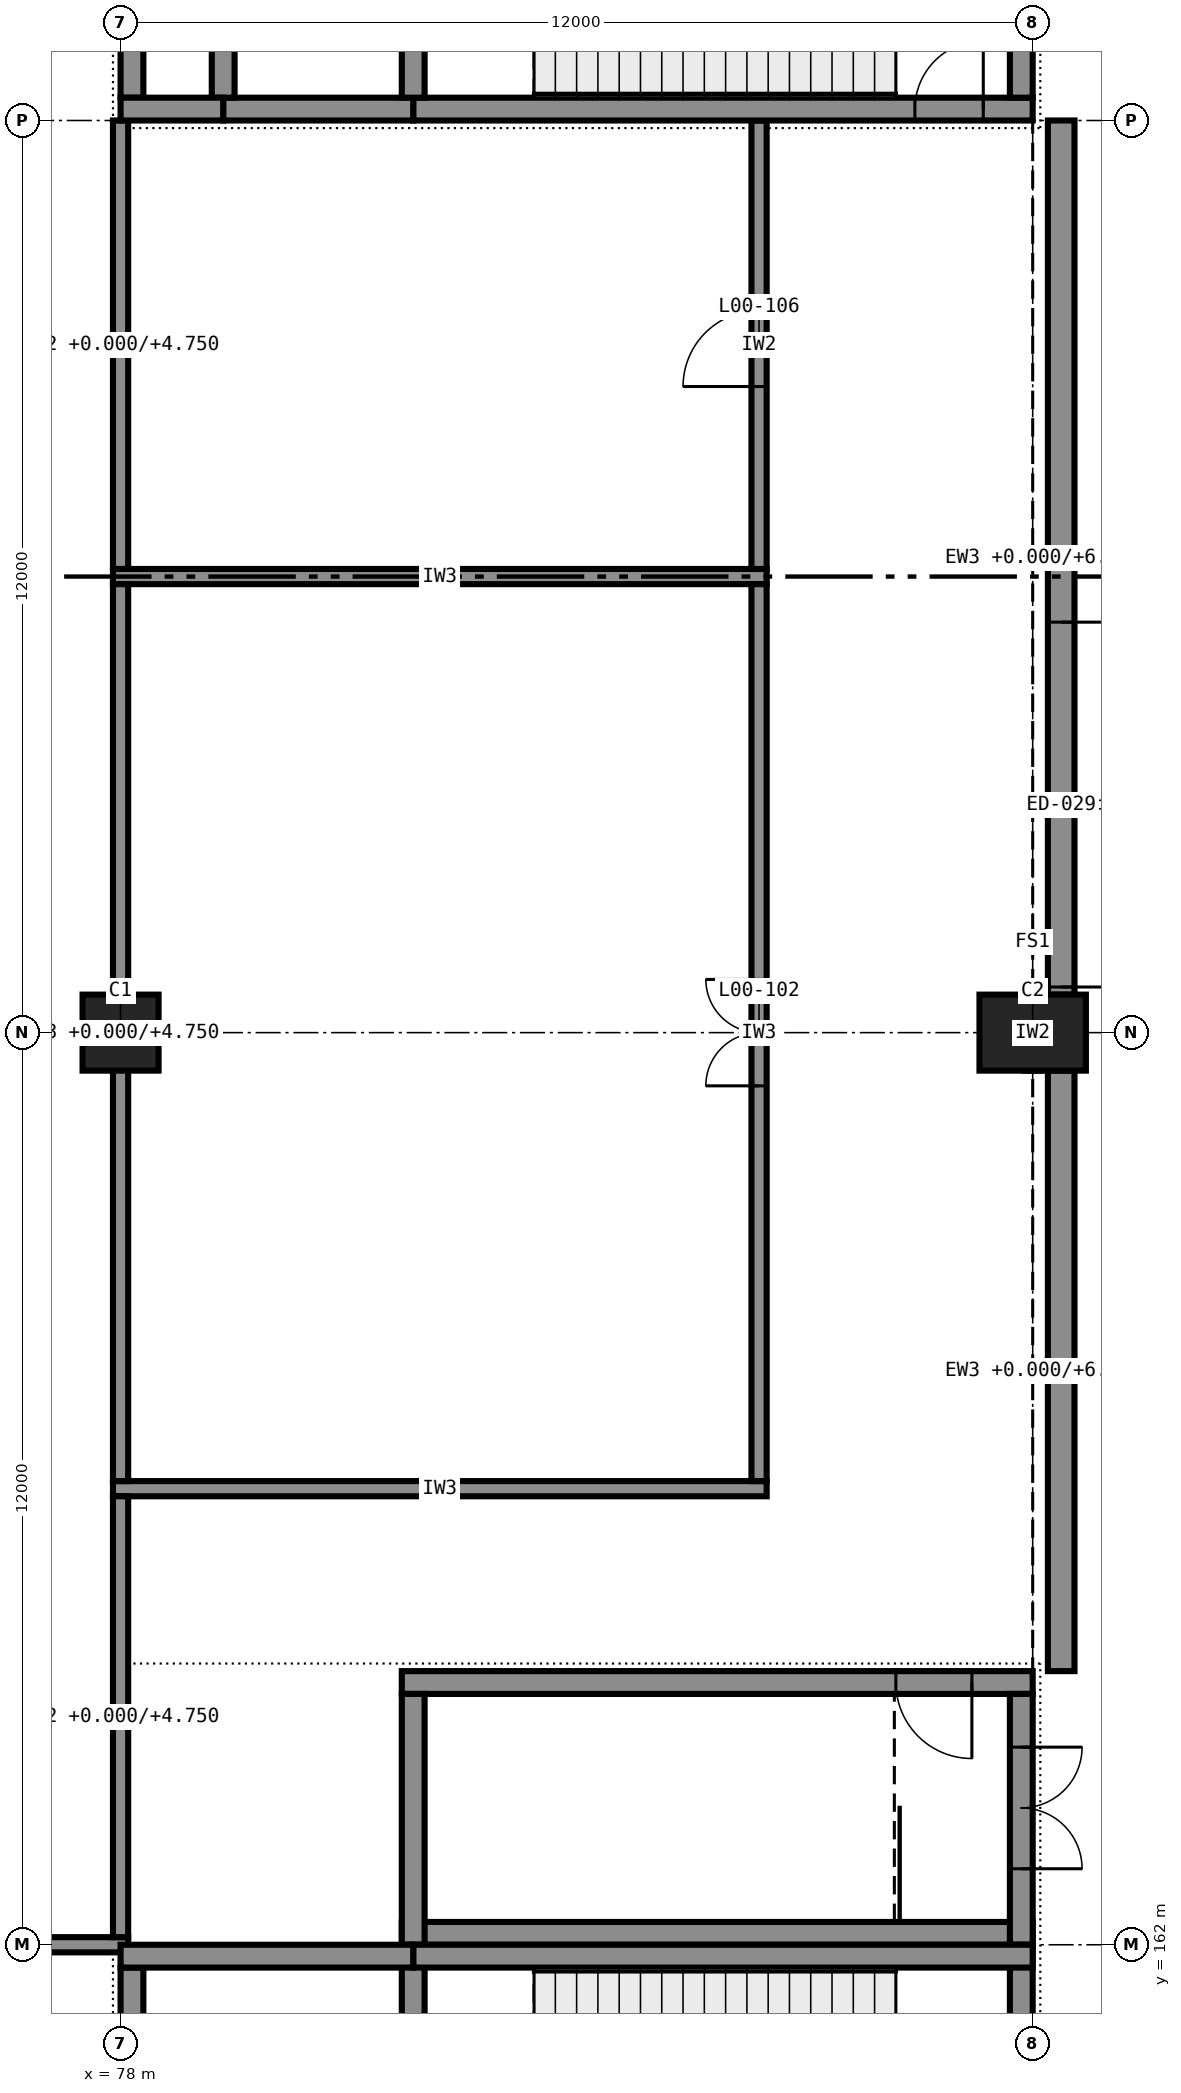
"""IFC4 building model, lengths in metres.
Left out: names, types, materials, properties, quantities, classifications, styles, units other than length and angle.
Written with IfcOpenShell. Run it as: python <this file> out.ifc"""

import sys

from ifc_helpers import new_model, si_unit, direction, frame, frame_2d, origin, origin_2d, place, context, subcontext, project, spatial, rectangle, extrude, element, fill, save


model = new_model("IFC4")
c1 = context("Model", 3, precision=1e-05, world=origin(), true_north=direction((0.0, 1.0)))
c2 = subcontext(c1, "Body", "Model", "MODEL_VIEW")
j1 = project(units=[si_unit("LENGTHUNIT", "METRE"), si_unit("PLANEANGLEUNIT", "RADIAN")], contexts=[c1])
p1 = place(None, origin())
s1 = spatial("IfcSite", under=j1, at=p1, CompositionType="ELEMENT")
p2 = place(p1, origin())
s2 = spatial("IfcBuilding", under=s1, at=p2, CompositionType="ELEMENT")
p3 = place(p2, origin())
s3 = spatial("IfcBuildingStorey", under=s2, at=p3, CompositionType="ELEMENT", Elevation=0.0)
p4 = place(p3, frame((78.0, 174.0, 0.0), z_axis=(0.0, 0.0, 1.0), x_axis=(1.0, 0.0, 0.0)))
e1 = element("IfcColumn", 1, at=p4, inside=s3, PredefinedType="COLUMN", context=c2, shape_type="SweptSolid", body=[
    extrude(rectangle(XDim=1.0, YDim=1.0, at=origin_2d()), origin(), (0.0, 0.0, 1.0), 6.0),
])
p5 = place(p3, frame((90.0, 174.0, 0.0), z_axis=(0.0, 0.0, 1.0), x_axis=(1.0, 0.0, 0.0)))
e2 = element("IfcColumn", 2, at=p5, inside=s3, PredefinedType="COLUMN", context=c2, shape_type="SweptSolid", body=[
    extrude(rectangle(XDim=1.4, YDim=1.0, at=origin_2d()), origin(), (0.0, 0.0, 1.0), 6.0),
])
p6 = place(p3, frame((90.0, 162.15, 0.0), z_axis=(0.0, 0.0, 1.0), x_axis=(-1.0, 0.0, 0.0)))
e3 = element("IfcWall", 3, at=p6, inside=s3, PredefinedType="SHEAR", context=c2, shape_type="SweptSolid", body=[
    extrude(rectangle(XDim=8.3, YDim=0.3, at=frame_2d((4.15, 0.0))), origin(), (0.0, 0.0, 1.0), 5.75),
])
p7 = place(p3, frame((90.0, 165.45, 0.0), z_axis=(0.0, 0.0, 1.0), x_axis=(-1.0, 0.0, 0.0)))
e4 = element("IfcWall", 4, at=p7, inside=s3, PredefinedType="SHEAR", context=c2, shape_type="SweptSolid", body=[
    extrude(rectangle(XDim=8.3, YDim=0.3, at=frame_2d((4.15, 0.0))), origin(), (0.0, 0.0, 1.0), 5.75),
])
p8 = place(p7, frame((0.8, 0.0, 0.0)))
e5 = element("IfcOpeningElement", 5, at=p8, cuts=e4, PredefinedType="OPENING", context=c2, shape_type="SweptSolid", body=[
    extrude(rectangle(XDim=1.0, YDim=2.1, at=frame_2d((0.5, 1.05))), frame((0.0, 0.16, 0.0), z_axis=(0.0, -1.0, 0.0), x_axis=(1.0, 0.0, 0.0)), (0.0, 0.0, 1.0), 0.32),
])
p9 = place(p3, frame((89.85, 162.0, 0.0), z_axis=(0.0, 0.0, 1.0), x_axis=(0.0, 1.0, 0.0)))
e6 = element("IfcWall", 6, at=p9, inside=s3, PredefinedType="SHEAR", context=c2, shape_type="SweptSolid", body=[
    extrude(rectangle(XDim=3.3, YDim=0.3, at=frame_2d((1.65, 0.0))), origin(), (0.0, 0.0, 1.0), 5.75),
])
p10 = place(p9, frame((1.0, 0.0, 0.0)))
e7 = element("IfcOpeningElement", 7, at=p10, cuts=e6, PredefinedType="OPENING", context=c2, shape_type="SweptSolid", body=[
    extrude(rectangle(XDim=1.6, YDim=2.1, at=frame_2d((0.8, 1.05))), frame((0.0, 0.16, 0.0), z_axis=(0.0, -1.0, 0.0), x_axis=(1.0, 0.0, 0.0)), (0.0, 0.0, 1.0), 0.32),
])
p11 = place(p3, frame((81.85, 162.0, 0.0), z_axis=(0.0, 0.0, 1.0), x_axis=(0.0, 1.0, 0.0)))
e8 = element("IfcWall", 8, at=p11, inside=s3, PredefinedType="SHEAR", context=c2, shape_type="SweptSolid", body=[
    extrude(rectangle(XDim=3.3, YDim=0.3, at=frame_2d((1.65, 0.0))), origin(), (0.0, 0.0, 1.0), 5.75),
])
p12 = place(p3, frame((90.0, 161.85, 0.0), z_axis=(0.0, 0.0, 1.0), x_axis=(-1.0, 0.0, 0.0)))
e9 = element("IfcWall", 9, at=p12, inside=s3, PredefinedType="SHEAR", context=c2, shape_type="SweptSolid", body=[
    extrude(rectangle(XDim=8.15, YDim=0.3, at=frame_2d((4.075, 0.0))), origin(), (0.0, 0.0, 1.0), 5.75),
])
p13 = place(p3, frame((81.85, 161.85, 0.0), z_axis=(0.0, 0.0, 1.0), x_axis=(-1.0, 0.0, 0.0)))
e10 = element("IfcWall", 10, at=p13, inside=s3, PredefinedType="SHEAR", context=c2, shape_type="SweptSolid", body=[
    extrude(rectangle(XDim=3.85, YDim=0.3, at=frame_2d((1.925, 0.0))), origin(), (0.0, 0.0, 1.0), 5.75),
])
p14 = place(p3, frame((89.85, 158.55, 0.0), z_axis=(0.0, 0.0, 1.0), x_axis=(0.0, 1.0, 0.0)))
e11 = element("IfcWall", 11, at=p14, inside=s3, PredefinedType="SHEAR", context=c2, shape_type="SweptSolid", body=[
    extrude(rectangle(XDim=3.45, YDim=0.3, at=frame_2d((1.725, 0.0))), origin(), (0.0, 0.0, 1.0), 5.75),
])
p15 = place(p14, frame((0.85, 0.0, 0.0)))
e12 = element("IfcOpeningElement", 12, at=p15, cuts=e11, PredefinedType="OPENING", context=c2, shape_type="SweptSolid", body=[
    extrude(rectangle(XDim=1.6, YDim=2.1, at=frame_2d((0.8, 1.05))), frame((0.0, 0.16, 0.0), z_axis=(0.0, -1.0, 0.0), x_axis=(1.0, 0.0, 0.0)), (0.0, 0.0, 1.0), 0.32),
])
p16 = place(p3, frame((78.15, 158.55, 0.0), z_axis=(0.0, 0.0, 1.0), x_axis=(0.0, 1.0, 0.0)))
e13 = element("IfcWall", 13, at=p16, inside=s3, PredefinedType="SHEAR", context=c2, shape_type="SweptSolid", body=[
    extrude(rectangle(XDim=3.15, YDim=0.3, at=frame_2d((1.575, 0.0))), origin(), (0.0, 0.0, 1.0), 5.75),
])
p17 = place(p16, frame((1.15, 0.0, 0.0)))
e14 = element("IfcOpeningElement", 14, at=p17, cuts=e13, PredefinedType="OPENING", context=c2, shape_type="SweptSolid", body=[
    extrude(rectangle(XDim=1.0, YDim=2.1, at=frame_2d((0.5, 1.05))), frame((0.0, 0.16, 0.0), z_axis=(0.0, -1.0, 0.0), x_axis=(1.0, 0.0, 0.0)), (0.0, 0.0, 1.0), 0.32),
])
p18 = place(p3, frame((81.85, 158.7, 0.0), z_axis=(0.0, 0.0, 1.0), x_axis=(0.0, 1.0, 0.0)))
e15 = element("IfcWall", 15, at=p18, inside=s3, PredefinedType="SHEAR", context=c2, shape_type="SweptSolid", body=[
    extrude(rectangle(XDim=3.3, YDim=0.3, at=frame_2d((1.65, 0.0))), origin(), (0.0, 0.0, 1.0), 5.75),
])
p19 = place(p3, frame((90.0, 186.15, 0.0), z_axis=(0.0, 0.0, 1.0), x_axis=(-1.0, 0.0, 0.0)))
e16 = element("IfcWall", 16, at=p19, inside=s3, PredefinedType="SHEAR", context=c2, shape_type="SweptSolid", body=[
    extrude(rectangle(XDim=8.15, YDim=0.3, at=frame_2d((4.075, 0.0))), origin(), (0.0, 0.0, 1.0), 5.75),
])
p20 = place(p19, frame((0.65, 0.0, 0.0)))
e17 = element("IfcOpeningElement", 17, at=p20, cuts=e16, PredefinedType="OPENING", context=c2, shape_type="SweptSolid", body=[
    extrude(rectangle(XDim=0.9, YDim=2.1, at=frame_2d((0.45, 1.05))), frame((0.0, 0.16, 0.0), z_axis=(0.0, -1.0, 0.0), x_axis=(1.0, 0.0, 0.0)), (0.0, 0.0, 1.0), 0.32),
])
p21 = place(p3, frame((81.85, 186.15, 0.0), z_axis=(0.0, 0.0, 1.0), x_axis=(-1.0, 0.0, 0.0)))
e18 = element("IfcWall", 18, at=p21, inside=s3, PredefinedType="SHEAR", context=c2, shape_type="SweptSolid", body=[
    extrude(rectangle(XDim=2.5, YDim=0.3, at=frame_2d((1.25, 0.0))), origin(), (0.0, 0.0, 1.0), 5.75),
])
p22 = place(p3, frame((79.35, 186.15, 0.0), z_axis=(0.0, 0.0, 1.0), x_axis=(-1.0, 0.0, 0.0)))
e19 = element("IfcWall", 19, at=p22, inside=s3, PredefinedType="SHEAR", context=c2, shape_type="SweptSolid", body=[
    extrude(rectangle(XDim=1.35, YDim=0.3, at=frame_2d((0.675, 0.0))), origin(), (0.0, 0.0, 1.0), 5.75),
])
p23 = place(p3, frame((89.85, 186.3, 0.0), z_axis=(0.0, 0.0, 1.0), x_axis=(0.0, 1.0, 0.0)))
e20 = element("IfcWall", 20, at=p23, inside=s3, PredefinedType="SHEAR", context=c2, shape_type="SweptSolid", body=[
    extrude(rectangle(XDim=3.15, YDim=0.3, at=frame_2d((1.575, 0.0))), origin(), (0.0, 0.0, 1.0), 5.75),
])
p24 = place(p23, frame((0.65, 0.0, 0.0)))
e21 = element("IfcOpeningElement", 21, at=p24, cuts=e20, PredefinedType="OPENING", context=c2, shape_type="SweptSolid", body=[
    extrude(rectangle(XDim=1.6, YDim=2.1, at=frame_2d((0.8, 1.05))), frame((0.0, 0.16, 0.0), z_axis=(0.0, -1.0, 0.0), x_axis=(1.0, 0.0, 0.0)), (0.0, 0.0, 1.0), 0.32),
])
p25 = place(p3, frame((78.15, 186.3, 0.0), z_axis=(0.0, 0.0, 1.0), x_axis=(0.0, 1.0, 0.0)))
e22 = element("IfcWall", 22, at=p25, inside=s3, PredefinedType="SHEAR", context=c2, shape_type="SweptSolid", body=[
    extrude(rectangle(XDim=3.15, YDim=0.3, at=frame_2d((1.575, 0.0))), origin(), (0.0, 0.0, 1.0), 5.75),
])
for number, where, z_axis, x_axis in (
    (23, (81.85, 186.3, 0.0), (0.0, 0.0, 1.0), (0.0, 1.0, 0.0)),
    (24, (79.35, 186.3, 0.0), (0.0, 0.0, 1.0), (0.0, 1.0, 0.0)),
):
    element("IfcWall", number, at=place(p3, frame(where, z_axis=z_axis, x_axis=x_axis)), inside=s3, PredefinedType="SHEAR", context=c2, shape_type="SweptSolid", body=[
        extrude(rectangle(XDim=3.0, YDim=0.3, at=frame_2d((1.5, 0.0))), origin(), (0.0, 0.0, 1.0), 5.75),
    ])
p26 = place(p3, frame((90.375, 165.6, 0.0), z_axis=(0.0, 0.0, 1.0), x_axis=(0.0, 1.0, 0.0)))
e25 = element("IfcWall", 25, at=p26, inside=s3, PredefinedType="STANDARD", context=c2, shape_type="SweptSolid", body=[
    extrude(rectangle(XDim=7.9, YDim=0.35, at=frame_2d((3.95, 0.0))), origin(), (0.0, 0.0, 1.0), 6.0),
])
p27 = place(p3, frame((90.375, 174.5, 0.0), z_axis=(0.0, 0.0, 1.0), x_axis=(0.0, 1.0, 0.0)))
e26 = element("IfcWall", 26, at=p27, inside=s3, PredefinedType="STANDARD", context=c2, shape_type="SweptSolid", body=[
    extrude(rectangle(XDim=11.5, YDim=0.35, at=frame_2d((5.75, 0.0))), origin(), (0.0, 0.0, 1.0), 6.0),
])
p28 = place(p27, frame((0.1, 0.0, 0.0)))
e27 = element("IfcOpeningElement", 27, at=p28, cuts=e26, PredefinedType="OPENING", context=c2, shape_type="SweptSolid", body=[
    extrude(rectangle(XDim=4.8, YDim=2.4, at=frame_2d((2.4, 1.2))), frame((0.0, 0.185, 0.0), z_axis=(0.0, -1.0, 0.0), x_axis=(1.0, 0.0, 0.0)), (0.0, 0.0, 1.0), 0.37),
])
p29 = place(p3, frame((29.9, 162.0, 0.0), z_axis=(0.0, 0.0, 1.0), x_axis=(1.0, 0.0, 0.0)))
e28 = element("IfcWall", 28, at=p29, inside=s3, PredefinedType="PARTITIONING", context=c2, shape_type="SweptSolid", body=[
    extrude(rectangle(XDim=48.2, YDim=0.2, at=frame_2d((24.1, 0.0))), origin(), (0.0, 0.0, 1.0), 4.75),
])
p30 = place(p29, frame((4.9, 0.0, 0.0)))
e29 = element("IfcOpeningElement", 29, at=p30, cuts=e28, PredefinedType="OPENING", context=c2, shape_type="SweptSolid", body=[
    extrude(rectangle(XDim=2.4, YDim=2.4, at=frame_2d((1.2, 1.2))), frame((0.0, 0.11, 0.0), z_axis=(0.0, -1.0, 0.0), x_axis=(1.0, 0.0, 0.0)), (0.0, 0.0, 1.0), 0.22),
])
p31 = place(p29, frame((16.9, 0.0, 0.0)))
e30 = element("IfcOpeningElement", 30, at=p31, cuts=e28, PredefinedType="OPENING", context=c2, shape_type="SweptSolid", body=[
    extrude(rectangle(XDim=2.4, YDim=2.4, at=frame_2d((1.2, 1.2))), frame((0.0, 0.11, 0.0), z_axis=(0.0, -1.0, 0.0), x_axis=(1.0, 0.0, 0.0)), (0.0, 0.0, 1.0), 0.22),
])
p32 = place(p29, frame((28.9, 0.0, 0.0)))
e31 = element("IfcOpeningElement", 31, at=p32, cuts=e28, PredefinedType="OPENING", context=c2, shape_type="SweptSolid", body=[
    extrude(rectangle(XDim=2.4, YDim=2.4, at=frame_2d((1.2, 1.2))), frame((0.0, 0.11, 0.0), z_axis=(0.0, -1.0, 0.0), x_axis=(1.0, 0.0, 0.0)), (0.0, 0.0, 1.0), 0.22),
])
p33 = place(p29, frame((40.9, 0.0, 0.0)))
e32 = element("IfcOpeningElement", 32, at=p33, cuts=e28, PredefinedType="OPENING", context=c2, shape_type="SweptSolid", body=[
    extrude(rectangle(XDim=2.4, YDim=2.4, at=frame_2d((1.2, 1.2))), frame((0.0, 0.11, 0.0), z_axis=(0.0, -1.0, 0.0), x_axis=(1.0, 0.0, 0.0)), (0.0, 0.0, 1.0), 0.22),
])
for number, where, z_axis, x_axis in (
    (33, (77.9, 168.0, 0.0), (0.0, 0.0, 1.0), (1.0, 0.0, 0.0)),
    (34, (77.9, 180.0, 0.0), (0.0, 0.0, 1.0), (1.0, 0.0, 0.0)),
):
    element("IfcWall", number, at=place(p3, frame(where, z_axis=z_axis, x_axis=x_axis)), inside=s3, PredefinedType="PARTITIONING", context=c2, shape_type="SweptSolid", body=[
        extrude(rectangle(XDim=8.6, YDim=0.2, at=frame_2d((4.3, 0.0))), origin(), (0.0, 0.0, 1.0), 5.75),
    ])
p34 = place(p3, frame((78.0, 162.1, 0.0), z_axis=(0.0, 0.0, 1.0), x_axis=(0.0, 1.0, 0.0)))
e35 = element("IfcWall", 35, at=p34, inside=s3, PredefinedType="PARTITIONING", context=c2, shape_type="SweptSolid", body=[
    extrude(rectangle(XDim=5.8, YDim=0.2, at=frame_2d((2.9, 0.0))), origin(), (0.0, 0.0, 1.0), 4.75),
])
p35 = place(p3, frame((78.0, 168.1, 0.0), z_axis=(0.0, 0.0, 1.0), x_axis=(0.0, 1.0, 0.0)))
e36 = element("IfcWall", 36, at=p35, inside=s3, PredefinedType="PARTITIONING", context=c2, shape_type="SweptSolid", body=[
    extrude(rectangle(XDim=11.8, YDim=0.2, at=frame_2d((5.9, 0.0))), origin(), (0.0, 0.0, 1.0), 4.75),
])
p36 = place(p3, frame((78.0, 180.1, 0.0), z_axis=(0.0, 0.0, 1.0), x_axis=(0.0, 1.0, 0.0)))
e37 = element("IfcWall", 37, at=p36, inside=s3, PredefinedType="PARTITIONING", context=c2, shape_type="SweptSolid", body=[
    extrude(rectangle(XDim=5.9, YDim=0.2, at=frame_2d((2.95, 0.0))), origin(), (0.0, 0.0, 1.0), 4.75),
])
p37 = place(p3, frame((86.4, 168.1, 0.0), z_axis=(0.0, 0.0, 1.0), x_axis=(0.0, 1.0, 0.0)))
e38 = element("IfcWall", 38, at=p37, inside=s3, PredefinedType="PARTITIONING", context=c2, shape_type="SweptSolid", body=[
    extrude(rectangle(XDim=11.8, YDim=0.2, at=frame_2d((5.9, 0.0))), origin(), (0.0, 0.0, 1.0), 5.75),
])
p38 = place(p37, frame((5.2, 0.0, 0.0)))
e39 = element("IfcOpeningElement", 39, at=p38, cuts=e38, PredefinedType="OPENING", context=c2, shape_type="SweptSolid", body=[
    extrude(rectangle(XDim=1.4, YDim=2.1, at=frame_2d((0.7, 1.05))), frame((0.0, 0.11, 0.0), z_axis=(0.0, -1.0, 0.0), x_axis=(1.0, 0.0, 0.0)), (0.0, 0.0, 1.0), 0.22),
])
p39 = place(p3, frame((86.4, 180.1, 0.0), z_axis=(0.0, 0.0, 1.0), x_axis=(0.0, 1.0, 0.0)))
e40 = element("IfcWall", 40, at=p39, inside=s3, PredefinedType="PARTITIONING", context=c2, shape_type="SweptSolid", body=[
    extrude(rectangle(XDim=5.9, YDim=0.2, at=frame_2d((2.95, 0.0))), origin(), (0.0, 0.0, 1.0), 5.75),
])
p40 = place(p39, frame((2.4, 0.0, 0.0)))
e41 = element("IfcOpeningElement", 41, at=p40, cuts=e40, PredefinedType="OPENING", context=c2, shape_type="SweptSolid", body=[
    extrude(rectangle(XDim=1.0, YDim=2.1, at=frame_2d((0.5, 1.05))), frame((0.0, 0.11, 0.0), z_axis=(0.0, -1.0, 0.0), x_axis=(1.0, 0.0, 0.0)), (0.0, 0.0, 1.0), 0.22),
])
p41 = place(p3, frame((90.0, 173.5, 0.0), z_axis=(0.0, 0.0, 1.0), x_axis=(0.0, 1.0, 0.0)))
e42 = element("IfcWall", 42, at=p41, inside=s3, PredefinedType="PARTITIONING", context=c2, shape_type="SweptSolid", body=[
    extrude(rectangle(XDim=1.0, YDim=0.2, at=frame_2d((0.5, 0.0))), origin(), (0.0, 0.0, 1.0), 5.75),
])
p42 = place(p28, frame((4.8, 0.0, 0.0), z_axis=(0.0, 0.0, 1.0), x_axis=(-1.0, 0.0, 0.0)))
e43 = element("IfcDoor", 43, at=p42, inside=s3, OperationType="DOUBLE_DOOR_SINGLE_SWING", PredefinedType="DOOR", context=c2, shape_type="SweptSolid", body=[
    extrude(rectangle(XDim=4.8, YDim=2.4, at=frame_2d((2.4, 1.2))), frame((0.0, 0.025, 0.0), z_axis=(0.0, -1.0, 0.0), x_axis=(1.0, 0.0, 0.0)), (0.0, 0.0, 1.0), 0.05),
])
fill(e27, e43)
p43 = place(p10, frame((1.6, 0.0, 0.0), z_axis=(0.0, 0.0, 1.0), x_axis=(-1.0, 0.0, 0.0)))
e44 = element("IfcDoor", 44, at=p43, inside=s3, OperationType="DOUBLE_DOOR_SINGLE_SWING", PredefinedType="DOOR", context=c2, shape_type="SweptSolid", body=[
    extrude(rectangle(XDim=1.6, YDim=2.1, at=frame_2d((0.8, 1.05))), frame((0.0, 0.025, 0.0), z_axis=(0.0, -1.0, 0.0), x_axis=(1.0, 0.0, 0.0)), (0.0, 0.0, 1.0), 0.05),
])
fill(e7, e44)
p44 = place(p8, origin())
e45 = element("IfcDoor", 45, at=p44, inside=s3, OperationType="SINGLE_SWING_RIGHT", PredefinedType="DOOR", context=c2, shape_type="SweptSolid", body=[
    extrude(rectangle(XDim=1.0, YDim=2.1, at=frame_2d((0.5, 1.05))), frame((0.0, 0.025, 0.0), z_axis=(0.0, -1.0, 0.0), x_axis=(1.0, 0.0, 0.0)), (0.0, 0.0, 1.0), 0.05),
])
fill(e5, e45)
p45 = place(p38, origin())
e46 = element("IfcDoor", 46, at=p45, inside=s3, OperationType="DOUBLE_DOOR_SINGLE_SWING", PredefinedType="DOOR", context=c2, shape_type="SweptSolid", body=[
    extrude(rectangle(XDim=1.4, YDim=2.1, at=frame_2d((0.7, 1.05))), frame((0.0, 0.025, 0.0), z_axis=(0.0, -1.0, 0.0), x_axis=(1.0, 0.0, 0.0)), (0.0, 0.0, 1.0), 0.05),
])
fill(e39, e46)
p46 = place(p40, origin())
e47 = element("IfcDoor", 47, at=p46, inside=s3, OperationType="SINGLE_SWING_RIGHT", PredefinedType="DOOR", context=c2, shape_type="SweptSolid", body=[
    extrude(rectangle(XDim=1.0, YDim=2.1, at=frame_2d((0.5, 1.05))), frame((0.0, 0.025, 0.0), z_axis=(0.0, -1.0, 0.0), x_axis=(1.0, 0.0, 0.0)), (0.0, 0.0, 1.0), 0.05),
])
fill(e41, e47)
p47 = place(p20, frame((0.9, 0.0, 0.0), z_axis=(0.0, 0.0, 1.0), x_axis=(-1.0, 0.0, 0.0)))
e48 = element("IfcDoor", 48, at=p47, inside=s3, OperationType="SINGLE_SWING_LEFT", PredefinedType="DOOR", context=c2, shape_type="SweptSolid", body=[
    extrude(rectangle(XDim=0.9, YDim=2.1, at=frame_2d((0.45, 1.05))), frame((0.0, 0.025, 0.0), z_axis=(0.0, -1.0, 0.0), x_axis=(1.0, 0.0, 0.0)), (0.0, 0.0, 1.0), 0.05),
])
fill(e17, e48)
save(model, sys.argv[1])
